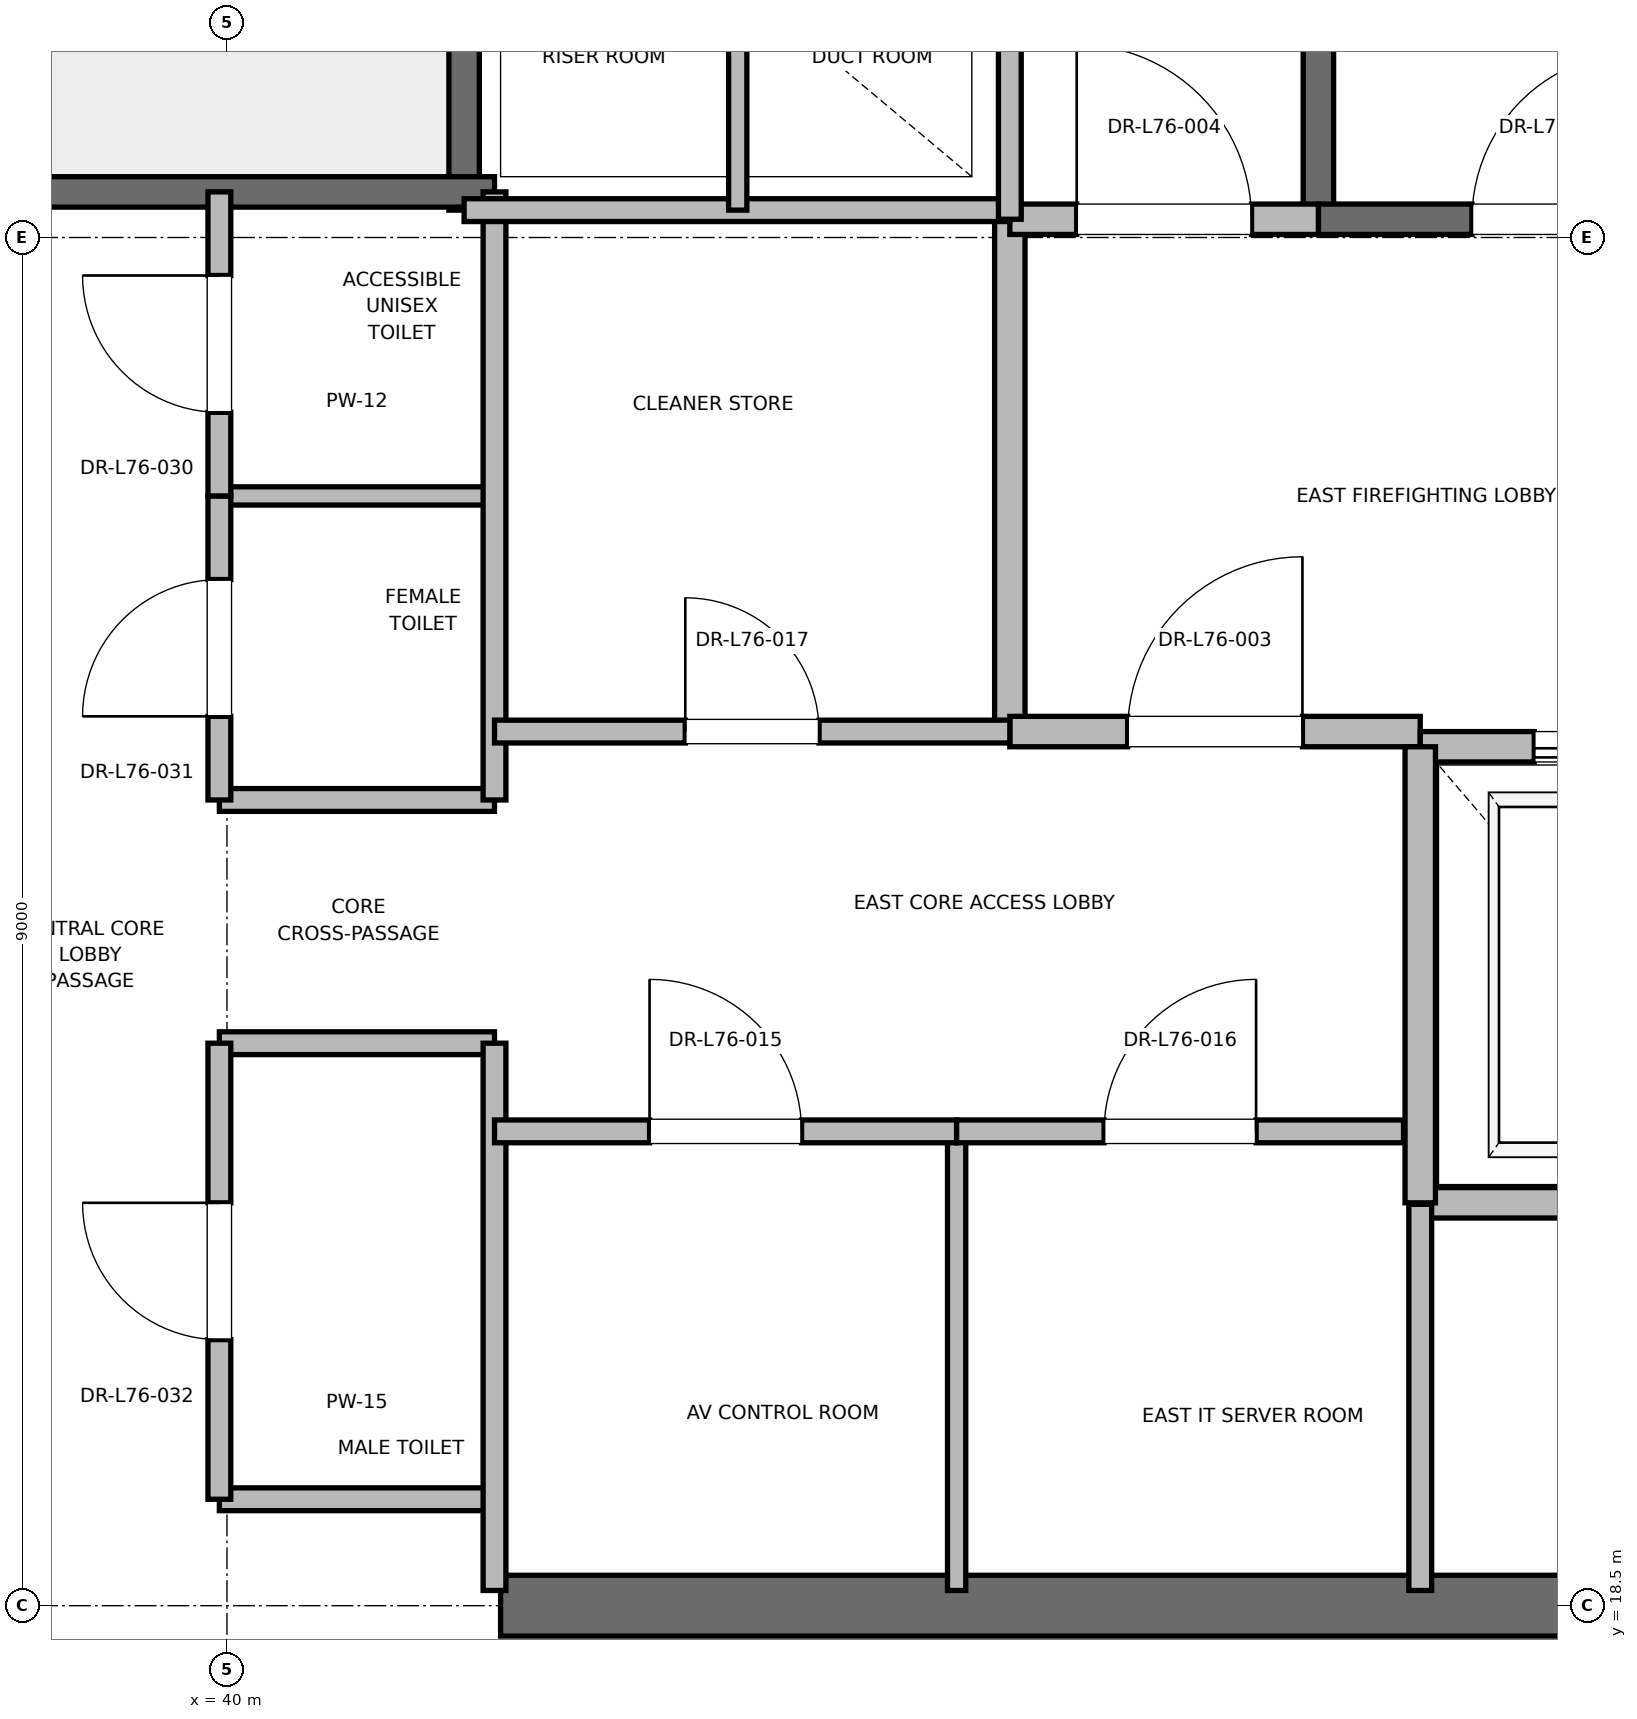
"""IFC4 building model, lengths in metres.
Left out: names, types, materials, properties, quantities, classifications, styles, units other than length and angle.
Written with IfcOpenShell. Run it as: python <this file> out.ifc"""

import sys

from ifc_helpers import new_model, si_unit, direction, frame, frame_2d, origin, place, context, subcontext, project, spatial, rectangle, extrude, element, fill, save


model = new_model("IFC4")
c1 = context("Model", 3, precision=1e-05, world=origin(), true_north=direction((0.0, 1.0)))
c2 = subcontext(c1, "Body", "Model", "MODEL_VIEW")
j1 = project(units=[si_unit("LENGTHUNIT", "METRE"), si_unit("PLANEANGLEUNIT", "RADIAN")], contexts=[c1])
p1 = place(None, origin())
s1 = spatial("IfcSite", under=j1, at=p1, CompositionType="ELEMENT")
p2 = place(p1, origin())
s2 = spatial("IfcBuilding", under=s1, at=p2, CompositionType="ELEMENT")
p3 = place(p2, frame((0.0, 0.0, 326.8)))
s3 = spatial("IfcBuildingStorey", under=s2, at=p3, CompositionType="ELEMENT", Elevation=326.8)
p4 = place(p3, frame((41.8, 18.5, 0.0), z_axis=(0.0, 0.0, 1.0), x_axis=(1.0, 0.0, 0.0)))
e1 = element("IfcWall", 1, at=p4, inside=s3, PredefinedType="SHEAR", context=c2, shape_type="SweptSolid", body=[
    extrude(rectangle(XDim=9.2, YDim=0.4, at=frame_2d((4.6, 0.0))), origin(), (0.0, 0.0, 1.0), 3.785),
])
p5 = place(p3, frame((47.18, 27.62, 0.0), z_axis=(0.0, 0.0, 1.0), x_axis=(0.0, 1.0, 0.0)))
e2 = element("IfcWall", 2, at=p5, inside=s3, PredefinedType="SOLIDWALL", context=c2, shape_type="SweptSolid", body=[
    extrude(rectangle(XDim=8.18, YDim=0.2, at=frame_2d((4.09, 0.0))), origin(), (0.0, 0.0, 1.0), 3.785),
])
p6 = place(p3, frame((47.18, 27.62, 0.0), z_axis=(0.0, 0.0, 1.0), x_axis=(1.0, 0.0, 0.0)))
e3 = element("IfcWall", 3, at=p6, inside=s3, PredefinedType="SOLIDWALL", context=c2, shape_type="SweptSolid", body=[
    extrude(rectangle(XDim=3.12, YDim=0.2, at=frame_2d((1.56, 0.0))), origin(), (0.0, 0.0, 1.0), 3.785),
])
p7 = place(p6, frame((1.01, 0.0, 0.0)))
e4 = element("IfcOpeningElement", 4, at=p7, cuts=e3, PredefinedType="OPENING", context=c2, shape_type="SweptSolid", body=[
    extrude(rectangle(XDim=1.1, YDim=2.15, at=frame_2d((0.55, 1.075))), frame((0.0, 0.1, 0.0), z_axis=(0.0, -1.0, 0.0), x_axis=(1.0, 0.0, 0.0)), (0.0, 0.0, 1.0), 0.2),
])
p8 = place(p3, frame((41.56, 27.68, 0.0), z_axis=(0.0, 0.0, 1.0), x_axis=(0.0, 1.0, 0.0)))
e5 = element("IfcWall", 5, at=p8, inside=s3, PredefinedType="SOLIDWALL", context=c2, shape_type="SweptSolid", body=[
    extrude(rectangle(XDim=8.57, YDim=0.2, at=frame_2d((4.285, 0.0))), origin(), (0.0, 0.0, 1.0), 3.785),
])
p9 = place(p3, frame((38.44, 27.8, 0.0), z_axis=(0.0, 0.0, 1.0), x_axis=(1.0, 0.0, 0.0)))
e6 = element("IfcWall", 6, at=p9, inside=s3, PredefinedType="SOLIDWALL", context=c2, shape_type="SweptSolid", body=[
    extrude(rectangle(XDim=3.32, YDim=0.2, at=frame_2d((1.66, 0.0))), origin(), (0.0, 0.0, 1.0), 3.785),
])
p10 = place(p3, frame((45.15, 24.25, 0.0), z_axis=(0.0, 0.0, 1.0), x_axis=(0.0, 1.0, 0.0)))
e7 = element("IfcWall", 7, at=p10, inside=s3, PredefinedType="PARTITIONING", context=c2, shape_type="SweptSolid", body=[
    extrude(rectangle(XDim=3.37, YDim=0.2, at=frame_2d((1.685, 0.0))), origin(), (0.0, 0.0, 1.0), 3.785),
])
p11 = place(p3, frame((45.15, 24.25, 0.0), z_axis=(0.0, 0.0, 1.0), x_axis=(1.0, 0.0, 0.0)))
e8 = element("IfcWall", 8, at=p11, inside=s3, PredefinedType="PARTITIONING", context=c2, shape_type="SweptSolid", body=[
    extrude(rectangle(XDim=2.7, YDim=0.2, at=frame_2d((1.35, 0.0))), origin(), (0.0, 0.0, 1.0), 3.785),
])
p12 = place(p11, frame((0.775, 0.0, 0.0)))
e9 = element("IfcOpeningElement", 9, at=p12, cuts=e8, PredefinedType="OPENING", context=c2, shape_type="SweptSolid", body=[
    extrude(rectangle(XDim=1.15, YDim=2.2, at=frame_2d((0.575, 1.1))), frame((0.0, 0.1, 0.0), z_axis=(0.0, -1.0, 0.0), x_axis=(1.0, 0.0, 0.0)), (0.0, 0.0, 1.0), 0.2),
])
p13 = place(p3, frame((45.15, 27.62, 0.0), z_axis=(0.0, 0.0, 1.0), x_axis=(1.0, 0.0, 0.0)))
e10 = element("IfcWall", 10, at=p13, inside=s3, PredefinedType="PARTITIONING", context=c2, shape_type="SweptSolid", body=[
    extrude(rectangle(XDim=2.03, YDim=0.2, at=frame_2d((1.015, 0.0))), origin(), (0.0, 0.0, 1.0), 3.785),
])
p14 = place(p13, frame((0.44, 0.0, 0.0)))
e11 = element("IfcOpeningElement", 11, at=p14, cuts=e10, PredefinedType="OPENING", context=c2, shape_type="SweptSolid", body=[
    extrude(rectangle(XDim=1.15, YDim=2.2, at=frame_2d((0.575, 1.1))), frame((0.0, 0.1, 0.0), z_axis=(0.0, -1.0, 0.0), x_axis=(1.0, 0.0, 0.0)), (0.0, 0.0, 1.0), 0.2),
])
p15 = place(p3, frame((47.85, 21.15, 0.0), z_axis=(0.0, 0.0, 1.0), x_axis=(1.0, 0.0, 0.0)))
e12 = element("IfcWall", 12, at=p15, inside=s3, PredefinedType="SOLIDWALL", context=c2, shape_type="SweptSolid", body=[
    extrude(rectangle(XDim=2.6, YDim=0.2, at=frame_2d((1.3, 0.0))), origin(), (0.0, 0.0, 1.0), 3.785),
])
p16 = place(p3, frame((50.45, 24.15, 0.0), z_axis=(0.0, 0.0, 1.0), x_axis=(-1.0, 0.0, 0.0)))
e13 = element("IfcWall", 13, at=p16, inside=s3, PredefinedType="SOLIDWALL", context=c2, shape_type="SweptSolid", body=[
    extrude(rectangle(XDim=2.6, YDim=0.2, at=frame_2d((1.3, 0.0))), origin(), (0.0, 0.0, 1.0), 2.865),
])
p17 = place(p16, frame((0.75, 0.0, 0.0)))
e14 = element("IfcOpeningElement", 14, at=p17, cuts=e13, PredefinedType="OPENING", context=c2, shape_type="SweptSolid", body=[
    extrude(rectangle(XDim=1.1, YDim=2.2, at=frame_2d((0.55, 1.1))), frame((0.0, 0.1, 0.0), z_axis=(0.0, -1.0, 0.0), x_axis=(1.0, 0.0, 0.0)), (0.0, 0.0, 1.0), 0.2),
])
p18 = place(p3, frame((47.85, 24.15, 0.0), z_axis=(0.0, 0.0, 1.0), x_axis=(0.0, -1.0, 0.0)))
e15 = element("IfcWall", 15, at=p18, inside=s3, PredefinedType="SOLIDWALL", context=c2, shape_type="SweptSolid", body=[
    extrude(rectangle(XDim=3.0, YDim=0.2, at=frame_2d((1.5, 0.0))), origin(), (0.0, 0.0, 1.0), 3.785),
])
for number, where, z_axis, x_axis in (
    (16, (39.95, 19.2, 0.0), (0.0, 0.0, 1.0), (1.0, 0.0, 0.0)),
    (17, (39.95, 22.2, 0.0), (0.0, 0.0, 1.0), (1.0, 0.0, 0.0)),
    (18, (39.95, 23.8, 0.0), (0.0, 0.0, 1.0), (1.0, 0.0, 0.0)),
):
    element("IfcWall", number, at=place(p3, frame(where, z_axis=z_axis, x_axis=x_axis)), inside=s3, PredefinedType="PARTITIONING", context=c2, shape_type="SweptSolid", body=[
        extrude(rectangle(XDim=1.81, YDim=0.15, at=frame_2d((0.905, 0.0))), origin(), (0.0, 0.0, 1.0), 2.85),
    ])
p19 = place(p3, frame((39.95, 25.8, 0.0), z_axis=(0.0, 0.0, 1.0), x_axis=(1.0, 0.0, 0.0)))
e19 = element("IfcWall", 19, at=p19, inside=s3, PredefinedType="PARTITIONING", context=c2, shape_type="SweptSolid", body=[
    extrude(rectangle(XDim=1.81, YDim=0.12, at=frame_2d((0.905, 0.0))), origin(), (0.0, 0.0, 1.0), 2.85),
])
p20 = place(p3, frame((41.76, 18.6, 0.0), z_axis=(0.0, 0.0, 1.0), x_axis=(0.0, 1.0, 0.0)))
e20 = element("IfcWall", 20, at=p20, inside=s3, PredefinedType="PARTITIONING", context=c2, shape_type="SweptSolid", body=[
    extrude(rectangle(XDim=3.6, YDim=0.15, at=frame_2d((1.8, 0.0))), origin(), (0.0, 0.0, 1.0), 2.85),
])
p21 = place(p3, frame((41.76, 23.8, 0.0), z_axis=(0.0, 0.0, 1.0), x_axis=(0.0, 1.0, 0.0)))
e21 = element("IfcWall", 21, at=p21, inside=s3, PredefinedType="PARTITIONING", context=c2, shape_type="SweptSolid", body=[
    extrude(rectangle(XDim=4.0, YDim=0.15, at=frame_2d((2.0, 0.0))), origin(), (0.0, 0.0, 1.0), 2.85),
])
p22 = place(p3, frame((39.95, 19.2, 0.0), z_axis=(0.0, 0.0, 1.0), x_axis=(0.0, 1.0, 0.0)))
e22 = element("IfcWall", 22, at=p22, inside=s3, PredefinedType="PARTITIONING", context=c2, shape_type="SweptSolid", body=[
    extrude(rectangle(XDim=3.0, YDim=0.15, at=frame_2d((1.5, 0.0))), origin(), (0.0, 0.0, 1.0), 2.85),
])
p23 = place(p22, frame((1.05, 0.0, 0.0)))
e23 = element("IfcOpeningElement", 23, at=p23, cuts=e22, PredefinedType="OPENING", context=c2, shape_type="SweptSolid", body=[
    extrude(rectangle(XDim=0.9, YDim=2.1, at=frame_2d((0.45, 1.05))), frame((0.0, 0.075, 0.0), z_axis=(0.0, -1.0, 0.0), x_axis=(1.0, 0.0, 0.0)), (0.0, 0.0, 1.0), 0.15),
])
p24 = place(p3, frame((39.95, 23.8, 0.0), z_axis=(0.0, 0.0, 1.0), x_axis=(0.0, 1.0, 0.0)))
e24 = element("IfcWall", 24, at=p24, inside=s3, PredefinedType="PARTITIONING", context=c2, shape_type="SweptSolid", body=[
    extrude(rectangle(XDim=2.0, YDim=0.15, at=frame_2d((1.0, 0.0))), origin(), (0.0, 0.0, 1.0), 2.85),
])
p25 = place(p24, frame((0.55, 0.0, 0.0)))
e25 = element("IfcOpeningElement", 25, at=p25, cuts=e24, PredefinedType="OPENING", context=c2, shape_type="SweptSolid", body=[
    extrude(rectangle(XDim=0.9, YDim=2.1, at=frame_2d((0.45, 1.05))), frame((0.0, 0.075, 0.0), z_axis=(0.0, -1.0, 0.0), x_axis=(1.0, 0.0, 0.0)), (0.0, 0.0, 1.0), 0.15),
])
p26 = place(p3, frame((39.95, 25.8, 0.0), z_axis=(0.0, 0.0, 1.0), x_axis=(0.0, 1.0, 0.0)))
e26 = element("IfcWall", 26, at=p26, inside=s3, PredefinedType="PARTITIONING", context=c2, shape_type="SweptSolid", body=[
    extrude(rectangle(XDim=2.0, YDim=0.15, at=frame_2d((1.0, 0.0))), origin(), (0.0, 0.0, 1.0), 2.85),
])
p27 = place(p26, frame((0.55, 0.0, 0.0)))
e27 = element("IfcOpeningElement", 27, at=p27, cuts=e26, PredefinedType="OPENING", context=c2, shape_type="SweptSolid", body=[
    extrude(rectangle(XDim=0.9, YDim=2.1, at=frame_2d((0.45, 1.05))), frame((0.0, 0.075, 0.0), z_axis=(0.0, -1.0, 0.0), x_axis=(1.0, 0.0, 0.0)), (0.0, 0.0, 1.0), 0.15),
])
p28 = place(p3, frame((41.56, 27.68, 0.0), z_axis=(0.0, 0.0, 1.0), x_axis=(1.0, 0.0, 0.0)))
e28 = element("IfcWall", 28, at=p28, inside=s3, PredefinedType="PARTITIONING", context=c2, shape_type="SweptSolid", body=[
    extrude(rectangle(XDim=3.59, YDim=0.15, at=frame_2d((1.795, 0.0))), origin(), (0.0, 0.0, 1.0), 2.85),
])
p29 = place(p3, frame((47.85, 18.6, 0.0), z_axis=(0.0, 0.0, 1.0), x_axis=(0.0, 1.0, 0.0)))
e29 = element("IfcWall", 29, at=p29, inside=s3, PredefinedType="PARTITIONING", context=c2, shape_type="SweptSolid", body=[
    extrude(rectangle(XDim=2.54, YDim=0.15, at=frame_2d((1.27, 0.0))), origin(), (0.0, 0.0, 1.0), 2.85),
])
p30 = place(p3, frame((44.8, 18.6, 0.0), z_axis=(0.0, 0.0, 1.0), x_axis=(0.0, 1.0, 0.0)))
e30 = element("IfcWall", 30, at=p30, inside=s3, PredefinedType="PARTITIONING", context=c2, shape_type="SweptSolid", body=[
    extrude(rectangle(XDim=3.02, YDim=0.12, at=frame_2d((1.51, 0.0))), origin(), (0.0, 0.0, 1.0), 2.85),
])
p31 = place(p3, frame((41.76, 21.62, 0.0), z_axis=(0.0, 0.0, 1.0), x_axis=(1.0, 0.0, 0.0)))
e31 = element("IfcWall", 31, at=p31, inside=s3, PredefinedType="PARTITIONING", context=c2, shape_type="SweptSolid", body=[
    extrude(rectangle(XDim=3.04, YDim=0.15, at=frame_2d((1.52, 0.0))), origin(), (0.0, 0.0, 1.0), 2.85),
])
p32 = place(p31, frame((1.02, 0.0, 0.0)))
e32 = element("IfcOpeningElement", 32, at=p32, cuts=e31, PredefinedType="OPENING", context=c2, shape_type="SweptSolid", body=[
    extrude(rectangle(XDim=1.0, YDim=2.15, at=frame_2d((0.5, 1.075))), frame((0.0, 0.075, 0.0), z_axis=(0.0, -1.0, 0.0), x_axis=(1.0, 0.0, 0.0)), (0.0, 0.0, 1.0), 0.15),
])
p33 = place(p3, frame((44.8, 21.62, 0.0), z_axis=(0.0, 0.0, 1.0), x_axis=(1.0, 0.0, 0.0)))
e33 = element("IfcWall", 33, at=p33, inside=s3, PredefinedType="PARTITIONING", context=c2, shape_type="SweptSolid", body=[
    extrude(rectangle(XDim=2.94, YDim=0.15, at=frame_2d((1.47, 0.0))), origin(), (0.0, 0.0, 1.0), 2.85),
])
p34 = place(p33, frame((0.97, 0.0, 0.0)))
e34 = element("IfcOpeningElement", 34, at=p34, cuts=e33, PredefinedType="OPENING", context=c2, shape_type="SweptSolid", body=[
    extrude(rectangle(XDim=1.0, YDim=2.15, at=frame_2d((0.5, 1.075))), frame((0.0, 0.075, 0.0), z_axis=(0.0, -1.0, 0.0), x_axis=(1.0, 0.0, 0.0)), (0.0, 0.0, 1.0), 0.15),
])
p35 = place(p3, frame((41.76, 24.25, 0.0), z_axis=(0.0, 0.0, 1.0), x_axis=(1.0, 0.0, 0.0)))
e35 = element("IfcWall", 35, at=p35, inside=s3, PredefinedType="PARTITIONING", context=c2, shape_type="SweptSolid", body=[
    extrude(rectangle(XDim=3.39, YDim=0.15, at=frame_2d((1.695, 0.0))), origin(), (0.0, 0.0, 1.0), 2.85),
])
p36 = place(p35, frame((1.255, 0.0, 0.0)))
e36 = element("IfcOpeningElement", 36, at=p36, cuts=e35, PredefinedType="OPENING", context=c2, shape_type="SweptSolid", body=[
    extrude(rectangle(XDim=0.88, YDim=2.1, at=frame_2d((0.44, 1.05))), frame((0.0, 0.075, 0.0), z_axis=(0.0, -1.0, 0.0), x_axis=(1.0, 0.0, 0.0)), (0.0, 0.0, 1.0), 0.15),
])
p37 = place(p3, frame((45.15, 27.62, 0.0), z_axis=(0.0, 0.0, 1.0), x_axis=(0.0, 1.0, 0.0)))
e37 = element("IfcWall", 37, at=p37, inside=s3, PredefinedType="PARTITIONING", context=c2, shape_type="SweptSolid", body=[
    extrude(rectangle(XDim=3.1, YDim=0.15, at=frame_2d((1.55, 0.0))), origin(), (0.0, 0.0, 1.0), 2.85),
])
p38 = place(p3, frame((43.36, 27.68, 0.0), z_axis=(0.0, 0.0, 1.0), x_axis=(0.0, 1.0, 0.0)))
e38 = element("IfcWall", 38, at=p38, inside=s3, PredefinedType="PARTITIONING", context=c2, shape_type="SweptSolid", body=[
    extrude(rectangle(XDim=3.04, YDim=0.12, at=frame_2d((1.52, 0.0))), origin(), (0.0, 0.0, 1.0), 2.85),
])
p39 = place(p7, origin())
e39 = element("IfcDoor", 39, at=p39, inside=s3, OperationType="SINGLE_SWING_RIGHT", PredefinedType="DOOR", context=c2, shape_type="SweptSolid", body=[
    extrude(rectangle(XDim=1.1, YDim=2.15, at=frame_2d((0.55, 1.075))), frame((0.0, 0.025, 0.0), z_axis=(0.0, -1.0, 0.0), x_axis=(1.0, 0.0, 0.0)), (0.0, 0.0, 1.0), 0.05),
])
fill(e4, e39)
p40 = place(p12, origin())
e40 = element("IfcDoor", 40, at=p40, inside=s3, OperationType="SINGLE_SWING_RIGHT", PredefinedType="DOOR", context=c2, shape_type="SweptSolid", body=[
    extrude(rectangle(XDim=1.15, YDim=2.2, at=frame_2d((0.575, 1.1))), frame((0.0, 0.025, 0.0), z_axis=(0.0, -1.0, 0.0), x_axis=(1.0, 0.0, 0.0)), (0.0, 0.0, 1.0), 0.05),
])
fill(e9, e40)
p41 = place(p14, origin())
e41 = element("IfcDoor", 41, at=p41, inside=s3, OperationType="SINGLE_SWING_LEFT", PredefinedType="DOOR", context=c2, shape_type="SweptSolid", body=[
    extrude(rectangle(XDim=1.15, YDim=2.2, at=frame_2d((0.575, 1.1))), frame((0.0, 0.025, 0.0), z_axis=(0.0, -1.0, 0.0), x_axis=(1.0, 0.0, 0.0)), (0.0, 0.0, 1.0), 0.05),
])
fill(e11, e41)
p42 = place(p17, origin())
e42 = element("IfcDoor", 42, at=p42, inside=s3, OperationType="SLIDING_TO_RIGHT", PredefinedType="DOOR", context=c2, shape_type="SweptSolid", body=[
    extrude(rectangle(XDim=1.1, YDim=2.2, at=frame_2d((0.55, 1.1))), frame((0.0, 0.025, 0.0), z_axis=(0.0, -1.0, 0.0), x_axis=(1.0, 0.0, 0.0)), (0.0, 0.0, 1.0), 0.05),
])
fill(e14, e42)
p43 = place(p23, origin())
e43 = element("IfcDoor", 43, at=p43, inside=s3, OperationType="SINGLE_SWING_RIGHT", PredefinedType="DOOR", context=c2, shape_type="SweptSolid", body=[
    extrude(rectangle(XDim=0.9, YDim=2.1, at=frame_2d((0.45, 1.05))), frame((0.0, 0.025, 0.0), z_axis=(0.0, -1.0, 0.0), x_axis=(1.0, 0.0, 0.0)), (0.0, 0.0, 1.0), 0.05),
])
fill(e23, e43)
p44 = place(p25, origin())
e44 = element("IfcDoor", 44, at=p44, inside=s3, OperationType="SINGLE_SWING_LEFT", PredefinedType="DOOR", context=c2, shape_type="SweptSolid", body=[
    extrude(rectangle(XDim=0.9, YDim=2.1, at=frame_2d((0.45, 1.05))), frame((0.0, 0.025, 0.0), z_axis=(0.0, -1.0, 0.0), x_axis=(1.0, 0.0, 0.0)), (0.0, 0.0, 1.0), 0.05),
])
fill(e25, e44)
p45 = place(p27, origin())
e45 = element("IfcDoor", 45, at=p45, inside=s3, OperationType="SINGLE_SWING_RIGHT", PredefinedType="DOOR", context=c2, shape_type="SweptSolid", body=[
    extrude(rectangle(XDim=0.9, YDim=2.1, at=frame_2d((0.45, 1.05))), frame((0.0, 0.025, 0.0), z_axis=(0.0, -1.0, 0.0), x_axis=(1.0, 0.0, 0.0)), (0.0, 0.0, 1.0), 0.05),
])
fill(e27, e45)
p46 = place(p32, origin())
e46 = element("IfcDoor", 46, at=p46, inside=s3, OperationType="SINGLE_SWING_LEFT", PredefinedType="DOOR", context=c2, shape_type="SweptSolid", body=[
    extrude(rectangle(XDim=1.0, YDim=2.15, at=frame_2d((0.5, 1.075))), frame((0.0, 0.025, 0.0), z_axis=(0.0, -1.0, 0.0), x_axis=(1.0, 0.0, 0.0)), (0.0, 0.0, 1.0), 0.05),
])
fill(e32, e46)
p47 = place(p34, origin())
e47 = element("IfcDoor", 47, at=p47, inside=s3, OperationType="SINGLE_SWING_RIGHT", PredefinedType="DOOR", context=c2, shape_type="SweptSolid", body=[
    extrude(rectangle(XDim=1.0, YDim=2.15, at=frame_2d((0.5, 1.075))), frame((0.0, 0.025, 0.0), z_axis=(0.0, -1.0, 0.0), x_axis=(1.0, 0.0, 0.0)), (0.0, 0.0, 1.0), 0.05),
])
fill(e34, e47)
p48 = place(p36, origin())
e48 = element("IfcDoor", 48, at=p48, inside=s3, OperationType="SINGLE_SWING_LEFT", PredefinedType="DOOR", context=c2, shape_type="SweptSolid", body=[
    extrude(rectangle(XDim=0.88, YDim=2.1, at=frame_2d((0.44, 1.05))), frame((0.0, 0.025, 0.0), z_axis=(0.0, -1.0, 0.0), x_axis=(1.0, 0.0, 0.0)), (0.0, 0.0, 1.0), 0.05),
])
fill(e36, e48)
save(model, sys.argv[1])
